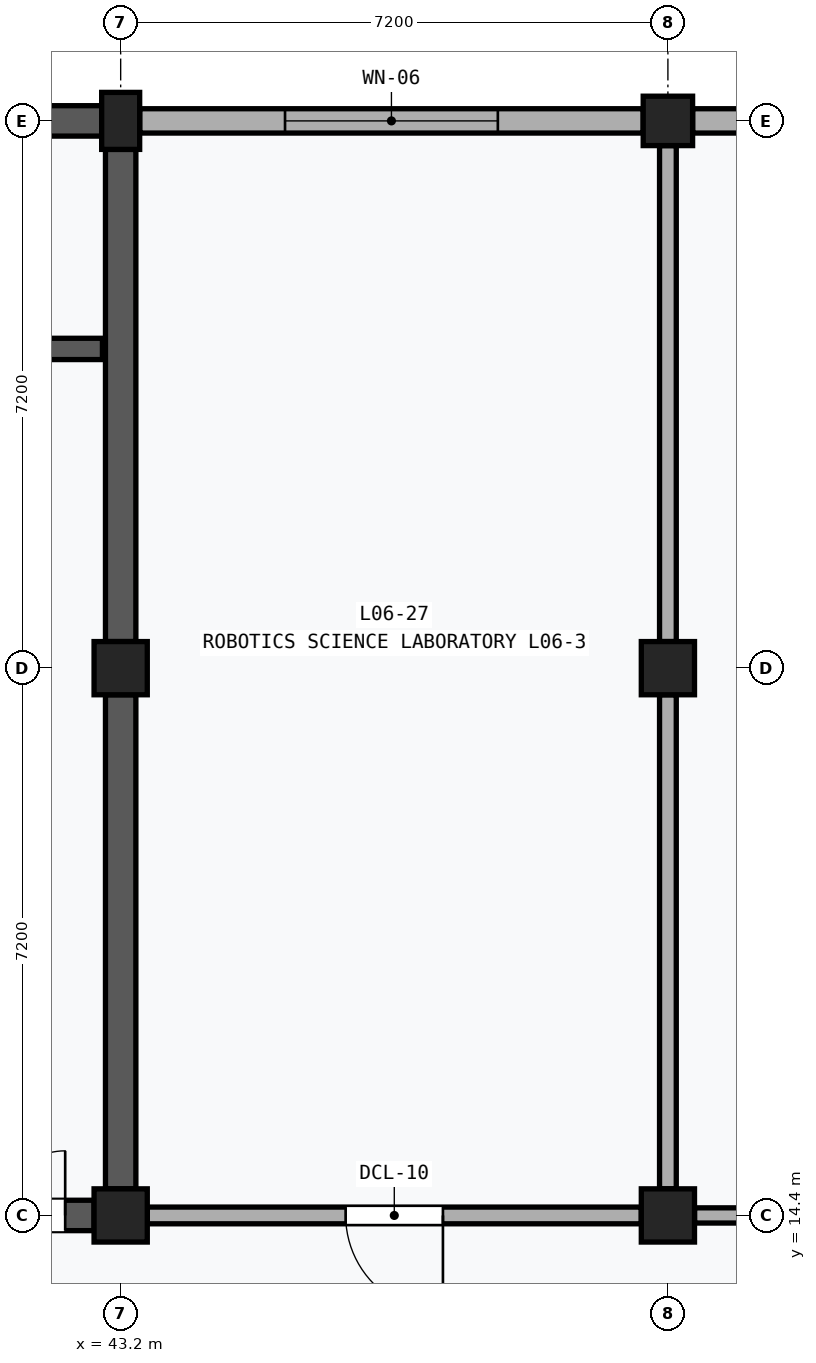
"""IFC4 building model, lengths in metres.
Left out: names, types, materials, properties, quantities, classifications, styles, units other than length and angle.
Written with IfcOpenShell. Run it as: python <this file> out.ifc"""

import sys

from ifc_helpers import new_model, si_unit, direction, frame, frame_2d, origin, origin_2d, place, context, subcontext, project, spatial, rectangle, extrude, element, fill, save


model = new_model("IFC4")
c1 = context("Model", 3, precision=1e-05, world=origin(), true_north=direction((0.0, 1.0)))
c2 = subcontext(c1, "Body", "Model", "MODEL_VIEW")
j1 = project(units=[si_unit("LENGTHUNIT", "METRE"), si_unit("PLANEANGLEUNIT", "RADIAN")], contexts=[c1])
p1 = place(None, origin())
s1 = spatial("IfcSite", under=j1, at=p1, CompositionType="ELEMENT")
p2 = place(p1, origin())
s2 = spatial("IfcBuilding", under=s1, at=p2, CompositionType="ELEMENT")
p3 = place(p2, frame((0.0, 0.0, 26.6)))
s3 = spatial("IfcBuildingStorey", under=s2, at=p3, CompositionType="ELEMENT", Elevation=26.6)
for number, where, z_axis, x_axis in (
    (1, (43.2, 14.4, 0.0), (0.0, 0.0, 1.0), (1.0, 0.0, 0.0)),
    (2, (43.2, 21.6, 0.0), (0.0, 0.0, 1.0), (1.0, 0.0, 0.0)),
):
    element("IfcColumn", number, at=place(p3, frame(where, z_axis=z_axis, x_axis=x_axis)), inside=s3, PredefinedType="COLUMN", context=c2, shape_type="SweptSolid", body=[
        extrude(rectangle(XDim=0.7, YDim=0.7, at=origin_2d()), origin(), (0.0, 0.0, 1.0), 4.0),
    ])
p4 = place(p3, frame((43.2, 28.8, 0.0), z_axis=(0.0, 0.0, 1.0), x_axis=(1.0, 0.0, 0.0)))
e3 = element("IfcColumn", 3, at=p4, inside=s3, PredefinedType="PILASTER", context=c2, shape_type="SweptSolid", body=[
    extrude(rectangle(XDim=0.5, YDim=0.75, at=origin_2d()), origin(), (0.0, 0.0, 1.0), 4.0),
])
for number, where, z_axis, x_axis in (
    (4, (50.4, 14.4, 0.0), (0.0, 0.0, 1.0), (1.0, 0.0, 0.0)),
    (5, (50.4, 21.6, 0.0), (0.0, 0.0, 1.0), (1.0, 0.0, 0.0)),
):
    element("IfcColumn", number, at=place(p3, frame(where, z_axis=z_axis, x_axis=x_axis)), inside=s3, PredefinedType="COLUMN", context=c2, shape_type="SweptSolid", body=[
        extrude(rectangle(XDim=0.7, YDim=0.7, at=origin_2d()), origin(), (0.0, 0.0, 1.0), 4.0),
    ])
p5 = place(p3, frame((50.4, 28.8, 0.0), z_axis=(0.0, 0.0, 1.0), x_axis=(1.0, 0.0, 0.0)))
e6 = element("IfcColumn", 6, at=p5, inside=s3, PredefinedType="COLUMN", context=c2, shape_type="SweptSolid", body=[
    extrude(rectangle(XDim=0.65, YDim=0.65, at=origin_2d()), origin(), (0.0, 0.0, 1.0), 4.0),
])
p6 = place(p3, frame((43.45, 28.8, 0.0), z_axis=(0.0, 0.0, 1.0), x_axis=(1.0, 0.0, 0.0)))
e7 = element("IfcWall", 7, at=p6, inside=s3, PredefinedType="SOLIDWALL", context=c2, shape_type="SweptSolid", body=[
    extrude(rectangle(XDim=6.625, YDim=0.32, at=frame_2d((3.312, 0.0))), origin(), (0.0, 0.0, 1.0), 3.1),
])
p7 = place(p6, frame((1.913, 0.0, 0.9)))
e8 = element("IfcOpeningElement", 8, at=p7, cuts=e7, PredefinedType="OPENING", context=c2, shape_type="SweptSolid", body=[
    extrude(rectangle(XDim=2.8, YDim=1.8, at=frame_2d((1.4, 0.9))), frame((0.0, 0.172, 0.0), z_axis=(0.0, -1.0, 0.0), x_axis=(1.0, 0.0, 0.0)), (0.0, 0.0, 1.0), 0.344),
])
p8 = place(p3, frame((50.725, 28.8, 0.0), z_axis=(0.0, 0.0, 1.0), x_axis=(1.0, 0.0, 0.0)))
e9 = element("IfcWall", 9, at=p8, inside=s3, PredefinedType="SOLIDWALL", context=c2, shape_type="SweptSolid", body=[
    extrude(rectangle(XDim=6.55, YDim=0.32, at=frame_2d((3.275, 0.0))), origin(), (0.0, 0.0, 1.0), 3.1),
])
p9 = place(p8, frame((1.775, 0.0, 0.9)))
e10 = element("IfcOpeningElement", 10, at=p9, cuts=e9, PredefinedType="OPENING", context=c2, shape_type="SweptSolid", body=[
    extrude(rectangle(XDim=3.0, YDim=1.8, at=frame_2d((1.5, 0.9))), frame((0.0, 0.172, 0.0), z_axis=(0.0, -1.0, 0.0), x_axis=(1.0, 0.0, 0.0)), (0.0, 0.0, 1.0), 0.344),
])
p10 = place(p3, frame((43.2, 14.75, 0.0), z_axis=(0.0, 0.0, 1.0), x_axis=(0.0, 1.0, 0.0)))
e11 = element("IfcWall", 11, at=p10, inside=s3, PredefinedType="SHEAR", context=c2, shape_type="SweptSolid", body=[
    extrude(rectangle(XDim=6.5, YDim=0.4, at=frame_2d((3.25, 0.0))), origin(), (0.0, 0.0, 1.0), 2.96),
])
p11 = place(p3, frame((43.2, 21.95, 0.0), z_axis=(0.0, 0.0, 1.0), x_axis=(0.0, 1.0, 0.0)))
e12 = element("IfcWall", 12, at=p11, inside=s3, PredefinedType="SHEAR", context=c2, shape_type="SweptSolid", body=[
    extrude(rectangle(XDim=6.475, YDim=0.4, at=frame_2d((3.238, 0.0))), origin(), (0.0, 0.0, 1.0), 2.96),
])
p12 = place(p3, frame((36.35, 14.4, 0.0), z_axis=(0.0, 0.0, 1.0), x_axis=(1.0, 0.0, 0.0)))
e13 = element("IfcWall", 13, at=p12, inside=s3, PredefinedType="SHEAR", context=c2, shape_type="SweptSolid", body=[
    extrude(rectangle(XDim=6.5, YDim=0.4, at=frame_2d((3.25, 0.0))), origin(), (0.0, 0.0, 1.0), 2.96),
])
p13 = place(p12, frame((4.42, 0.0, 0.0)))
e14 = element("IfcOpeningElement", 14, at=p13, cuts=e13, PredefinedType="OPENING", context=c2, shape_type="SweptSolid", body=[
    extrude(rectangle(XDim=1.7, YDim=2.25, at=frame_2d((0.85, 1.125))), frame((0.0, 0.212, 0.0), z_axis=(0.0, -1.0, 0.0), x_axis=(1.0, 0.0, 0.0)), (0.0, 0.0, 1.0), 0.424),
])
p14 = place(p3, frame((36.325, 28.8, 0.0), z_axis=(0.0, 0.0, 1.0), x_axis=(1.0, 0.0, 0.0)))
e15 = element("IfcWall", 15, at=p14, inside=s3, PredefinedType="SHEAR", context=c2, shape_type="SweptSolid", body=[
    extrude(rectangle(XDim=6.625, YDim=0.4, at=frame_2d((3.312, 0.0))), origin(), (0.0, 0.0, 1.0), 3.1),
])
p15 = place(p3, frame((40.28, 25.8, 0.0), z_axis=(0.0, 0.0, 1.0), x_axis=(1.0, 0.0, 0.0)))
e16 = element("IfcWall", 16, at=p15, inside=s3, PredefinedType="SHEAR", context=c2, shape_type="SweptSolid", body=[
    extrude(rectangle(XDim=2.68, YDim=0.28, at=frame_2d((1.34, 0.0))), origin(), (0.0, 0.0, 1.0), 3.73),
])
p16 = place(p15, frame((0.65, 0.0, 0.0)))
e17 = element("IfcOpeningElement", 17, at=p16, cuts=e16, PredefinedType="OPENING", context=c2, shape_type="SweptSolid", body=[
    extrude(rectangle(XDim=1.0, YDim=2.15, at=frame_2d((0.5, 1.075))), frame((0.0, 0.152, 0.0), z_axis=(0.0, -1.0, 0.0), x_axis=(1.0, 0.0, 0.0)), (0.0, 0.0, 1.0), 0.304),
])
p17 = place(p3, frame((43.55, 14.4, 0.0), z_axis=(0.0, 0.0, 1.0), x_axis=(1.0, 0.0, 0.0)))
e18 = element("IfcWall", 18, at=p17, inside=s3, PredefinedType="PARTITIONING", context=c2, shape_type="SweptSolid", body=[
    extrude(rectangle(XDim=6.5, YDim=0.22, at=frame_2d((3.25, 0.0))), origin(), (0.0, 0.0, 1.0), 3.03),
])
p18 = place(p17, frame((2.61, 0.0, 0.0)))
e19 = element("IfcOpeningElement", 19, at=p18, cuts=e18, PredefinedType="OPENING", context=c2, shape_type="SweptSolid", body=[
    extrude(rectangle(XDim=1.28, YDim=2.28, at=frame_2d((0.64, 1.14))), frame((0.0, 0.122, 0.0), z_axis=(0.0, -1.0, 0.0), x_axis=(1.0, 0.0, 0.0)), (0.0, 0.0, 1.0), 0.244),
])
p19 = place(p3, frame((50.4, 14.75, 0.0), z_axis=(0.0, 0.0, 1.0), x_axis=(0.0, 1.0, 0.0)))
e20 = element("IfcWall", 20, at=p19, inside=s3, PredefinedType="PARTITIONING", context=c2, shape_type="SweptSolid", body=[
    extrude(rectangle(XDim=6.5, YDim=0.22, at=frame_2d((3.25, 0.0))), origin(), (0.0, 0.0, 1.0), 2.96),
])
p20 = place(p3, frame((50.4, 21.95, 0.0), z_axis=(0.0, 0.0, 1.0), x_axis=(0.0, 1.0, 0.0)))
e21 = element("IfcWall", 21, at=p20, inside=s3, PredefinedType="PARTITIONING", context=c2, shape_type="SweptSolid", body=[
    extrude(rectangle(XDim=6.525, YDim=0.22, at=frame_2d((3.263, 0.0))), origin(), (0.0, 0.0, 1.0), 2.96),
])
p21 = place(p3, frame((50.75, 14.4, 0.0), z_axis=(0.0, 0.0, 1.0), x_axis=(1.0, 0.0, 0.0)))
e22 = element("IfcWall", 22, at=p21, inside=s3, PredefinedType="PARTITIONING", context=c2, shape_type="SweptSolid", body=[
    extrude(rectangle(XDim=6.5, YDim=0.2, at=frame_2d((3.25, 0.0))), origin(), (0.0, 0.0, 1.0), 2.96),
])
p22 = place(p21, frame((2.75, 0.0, 0.0)))
e23 = element("IfcOpeningElement", 23, at=p22, cuts=e22, PredefinedType="OPENING", context=c2, shape_type="SweptSolid", body=[
    extrude(rectangle(XDim=1.0, YDim=2.1, at=frame_2d((0.5, 1.05))), frame((0.0, 0.112, 0.0), z_axis=(0.0, -1.0, 0.0), x_axis=(1.0, 0.0, 0.0)), (0.0, 0.0, 1.0), 0.224),
])
p23 = place(p7, origin())
e24 = element("IfcWindow", 24, at=p23, inside=s3, PartitioningType="SINGLE_PANEL", PredefinedType="WINDOW", context=c2, shape_type="SweptSolid", body=[
    extrude(rectangle(XDim=2.8, YDim=1.8, at=frame_2d((1.4, 0.9))), frame((0.0, 0.03, 0.0), z_axis=(0.0, -1.0, 0.0), x_axis=(1.0, 0.0, 0.0)), (0.0, 0.0, 1.0), 0.06),
])
fill(e8, e24)
p24 = place(p13, origin())
e25 = element("IfcDoor", 25, at=p24, inside=s3, OperationType="DOUBLE_DOOR_SINGLE_SWING", PredefinedType="DOOR", context=c2, shape_type="SweptSolid", body=[
    extrude(rectangle(XDim=1.7, YDim=2.25, at=frame_2d((0.85, 1.125))), frame((0.0, 0.025, 0.0), z_axis=(0.0, -1.0, 0.0), x_axis=(1.0, 0.0, 0.0)), (0.0, 0.0, 1.0), 0.05),
])
fill(e14, e25)
p25 = place(p18, frame((1.28, 0.0, 0.0), z_axis=(0.0, 0.0, 1.0), x_axis=(-1.0, 0.0, 0.0)))
e26 = element("IfcDoor", 26, at=p25, inside=s3, OperationType="SINGLE_SWING_LEFT", PredefinedType="DOOR", context=c2, shape_type="SweptSolid", body=[
    extrude(rectangle(XDim=1.28, YDim=2.28, at=frame_2d((0.64, 1.14))), frame((0.0, 0.025, 0.0), z_axis=(0.0, -1.0, 0.0), x_axis=(1.0, 0.0, 0.0)), (0.0, 0.0, 1.0), 0.05),
])
fill(e19, e26)
save(model, sys.argv[1])
